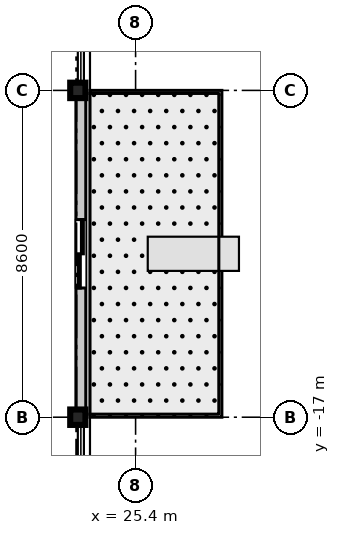
"""IFC4 building model, lengths in metres.
Left out: names, types, materials, properties, quantities, classifications, styles, units other than length and angle.
Written with IfcOpenShell. Run it as: python <this file> out.ifc"""

import sys

from ifc_helpers import new_model, si_unit, direction, frame, frame_2d, origin, origin_2d, place, context, subcontext, project, spatial, rectangle, i_section, extrude, source, transform, mapped, element, fill, save


model = new_model("IFC4")
c1 = context("Model", 3, precision=1e-05, world=origin(), true_north=direction((0.0, 1.0)))
c2 = subcontext(c1, "Body", "Model", "MODEL_VIEW")
j1 = project(units=[si_unit("LENGTHUNIT", "METRE"), si_unit("PLANEANGLEUNIT", "RADIAN")], contexts=[c1])
p1 = place(None, origin())
s1 = spatial("IfcSite", under=j1, at=p1, CompositionType="ELEMENT")
p2 = place(p1, origin())
s2 = spatial("IfcBuilding", under=s1, at=p2, CompositionType="ELEMENT")
p3 = place(p2, frame((0.0, 0.0, 219.7)))
s3 = spatial("IfcBuildingStorey", under=s2, at=p3, CompositionType="ELEMENT", Elevation=219.7)
m1 = source(origin(), c2, "Body", "SweptSolid", [
    extrude(i_section(OverallWidth=0.401, OverallDepth=0.406, WebThickness=0.016, FlangeThickness=0.025, at=origin_2d()), origin(), (0.0, 0.0, 1.0), 3.655),
])
for number, where, z_axis, x_axis in (
    (1, (23.88, -17.0, 0.0), (0.0, 0.0, 1.0), (1.0, 0.0, 0.0)),
    (2, (23.88, -8.4, 0.0), (0.0, 0.0, 1.0), (1.0, 0.0, 0.0)),
):
    element("IfcColumn", number, at=place(p3, frame(where, z_axis=z_axis, x_axis=x_axis)), inside=s3, PredefinedType="COLUMN", context=c2, shape_type="MappedRepresentation", body=[
        mapped(m1, transform((0.0, 0.0, 0.0), scale=1.0)),
    ])
m2 = source(origin(), c2, "Body", "SweptSolid", [
    extrude(rectangle(XDim=8.6, YDim=0.26, at=frame_2d((4.3, 0.0))), origin(), (0.0, 0.0, 1.0), 2.89),
])
p4 = place(p3, frame((23.96, -17.0, 0.0), z_axis=(0.0, 0.0, 1.0), x_axis=(0.0, 1.0, 0.0)))
e3 = element("IfcWall", 3, at=p4, inside=s3, PredefinedType="STANDARD", context=c2, shape_type="MappedRepresentation", body=[
    mapped(m2, transform((0.0, 0.0, 0.0), scale=1.0)),
])
p5 = place(p4, frame((3.4, 0.0, 0.0)))
e4 = element("IfcOpeningElement", 4, at=p5, cuts=e3, PredefinedType="OPENING", context=c2, shape_type="SweptSolid", body=[
    extrude(rectangle(XDim=1.8, YDim=2.25, at=frame_2d((0.9, 1.125))), frame((0.0, 0.14, 0.0), z_axis=(0.0, -1.0, 0.0), x_axis=(1.0, 0.0, 0.0)), (0.0, 0.0, 1.0), 0.28),
])
m3 = source(origin(), c2, "Body", "SweptSolid", [
    extrude(rectangle(XDim=1.8, YDim=2.25, at=frame_2d((0.9, 1.125))), frame((0.0, 0.025, 0.0), z_axis=(0.0, -1.0, 0.0), x_axis=(1.0, 0.0, 0.0)), (0.0, 0.0, 1.0), 0.05),
])
p6 = place(p5, frame((1.8, 0.0, 0.0), z_axis=(0.0, 0.0, 1.0), x_axis=(-1.0, 0.0, 0.0)))
e5 = element("IfcDoor", 5, at=p6, inside=s3, OperationType="DOUBLE_DOOR_SLIDING", PredefinedType="DOOR", context=c2, shape_type="MappedRepresentation", body=[
    mapped(m3, transform((0.0, 0.0, 0.0), scale=1.0)),
])
fill(e4, e5)
save(model, sys.argv[1])
